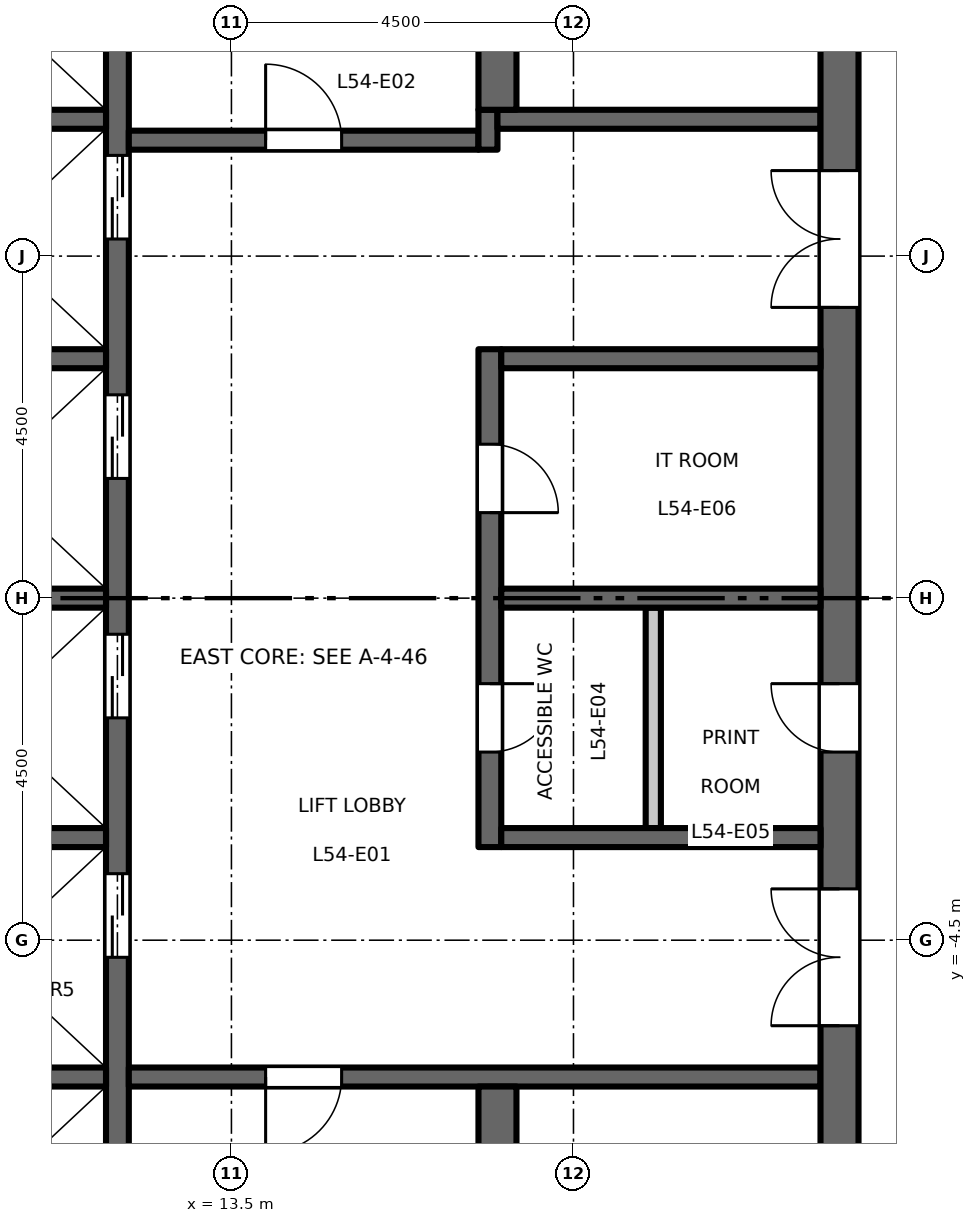
"""IFC4 building model, lengths in metres.
Left out: names, types, materials, properties, quantities, classifications, styles, units other than length and angle.
Written with IfcOpenShell. Run it as: python <this file> out.ifc"""

import sys

from ifc_helpers import new_model, si_unit, direction, frame, frame_2d, origin, place, context, subcontext, project, spatial, rectangle, extrude, element, fill, save


model = new_model("IFC4")
c1 = context("Model", 3, precision=1e-05, world=origin(), true_north=direction((0.0, 1.0)))
c2 = subcontext(c1, "Body", "Model", "MODEL_VIEW")
j1 = project(units=[si_unit("LENGTHUNIT", "METRE"), si_unit("PLANEANGLEUNIT", "RADIAN")], contexts=[c1])
p1 = place(None, origin())
s1 = spatial("IfcSite", under=j1, at=p1, CompositionType="ELEMENT")
p2 = place(p1, origin())
s2 = spatial("IfcBuilding", under=s1, at=p2, CompositionType="ELEMENT")
p3 = place(p2, frame((0.0, 0.0, 251.2)))
s3 = spatial("IfcBuildingStorey", under=s2, at=p3, CompositionType="ELEMENT", Elevation=251.2)
p4 = place(p3, frame((12.0, -9.45, 0.0), z_axis=(0.0, 0.0, 1.0), x_axis=(0.0, 1.0, 0.0)))
e1 = element("IfcWall", 1, at=p4, inside=s3, PredefinedType="SHEAR", context=c2, shape_type="SweptSolid", body=[
    extrude(rectangle(XDim=18.9, YDim=0.3, at=frame_2d((9.45, 0.0))), origin(), (0.0, 0.0, 1.0), 4.35),
])
p5 = place(p4, frame((4.725, 0.0, 0.0)))
e2 = element("IfcOpeningElement", 2, at=p5, cuts=e1, PredefinedType="OPENING", context=c2, shape_type="SweptSolid", body=[
    extrude(rectangle(XDim=1.1, YDim=2.1, at=frame_2d((0.55, 1.05))), frame((0.0, 0.16, 0.0), z_axis=(0.0, -1.0, 0.0), x_axis=(1.0, 0.0, 0.0)), (0.0, 0.0, 1.0), 0.32),
])
p6 = place(p4, frame((7.875, 0.0, 0.0)))
e3 = element("IfcOpeningElement", 3, at=p6, cuts=e1, PredefinedType="OPENING", context=c2, shape_type="SweptSolid", body=[
    extrude(rectangle(XDim=1.1, YDim=2.1, at=frame_2d((0.55, 1.05))), frame((0.0, 0.16, 0.0), z_axis=(0.0, -1.0, 0.0), x_axis=(1.0, 0.0, 0.0)), (0.0, 0.0, 1.0), 0.32),
])
p7 = place(p4, frame((11.025, 0.0, 0.0)))
e4 = element("IfcOpeningElement", 4, at=p7, cuts=e1, PredefinedType="OPENING", context=c2, shape_type="SweptSolid", body=[
    extrude(rectangle(XDim=1.1, YDim=2.1, at=frame_2d((0.55, 1.05))), frame((0.0, 0.16, 0.0), z_axis=(0.0, -1.0, 0.0), x_axis=(1.0, 0.0, 0.0)), (0.0, 0.0, 1.0), 0.32),
])
p8 = place(p4, frame((14.175, 0.0, 0.0)))
e5 = element("IfcOpeningElement", 5, at=p8, cuts=e1, PredefinedType="OPENING", context=c2, shape_type="SweptSolid", body=[
    extrude(rectangle(XDim=1.1, YDim=2.1, at=frame_2d((0.55, 1.05))), frame((0.0, 0.16, 0.0), z_axis=(0.0, -1.0, 0.0), x_axis=(1.0, 0.0, 0.0)), (0.0, 0.0, 1.0), 0.32),
])
p9 = place(p4, frame((16.725, 0.0, 0.0)))
e6 = element("IfcOpeningElement", 6, at=p9, cuts=e1, PredefinedType="OPENING", context=c2, shape_type="SweptSolid", body=[
    extrude(rectangle(XDim=1.2, YDim=2.1, at=frame_2d((0.6, 1.05))), frame((0.0, 0.16, 0.0), z_axis=(0.0, -1.0, 0.0), x_axis=(1.0, 0.0, 0.0)), (0.0, 0.0, 1.0), 0.32),
])
p10 = place(p4, frame((0.975, 0.0, 0.0)))
e7 = element("IfcOpeningElement", 7, at=p10, cuts=e1, PredefinedType="OPENING", context=c2, shape_type="SweptSolid", body=[
    extrude(rectangle(XDim=1.2, YDim=2.1, at=frame_2d((0.6, 1.05))), frame((0.0, 0.16, 0.0), z_axis=(0.0, -1.0, 0.0), x_axis=(1.0, 0.0, 0.0)), (0.0, 0.0, 1.0), 0.32),
])
p11 = place(p3, frame((12.15, 6.025, 0.0), z_axis=(0.0, 0.0, 1.0), x_axis=(1.0, 0.0, 0.0)))
e8 = element("IfcWall", 8, at=p11, inside=s3, PredefinedType="SHEAR", context=c2, shape_type="SweptSolid", body=[
    extrude(rectangle(XDim=4.6, YDim=0.25, at=frame_2d((2.3, 0.0))), origin(), (0.0, 0.0, 1.0), 4.35),
])
p12 = place(p11, frame((1.8, 0.0, 0.0)))
e9 = element("IfcOpeningElement", 9, at=p12, cuts=e8, PredefinedType="OPENING", context=c2, shape_type="SweptSolid", body=[
    extrude(rectangle(XDim=1.0, YDim=2.1, at=frame_2d((0.5, 1.05))), frame((0.0, 0.135, 0.0), z_axis=(0.0, -1.0, 0.0), x_axis=(1.0, 0.0, 0.0)), (0.0, 0.0, 1.0), 0.27),
])
p13 = place(p3, frame((16.875, 5.9, 0.0), z_axis=(0.0, 0.0, 1.0), x_axis=(0.0, 1.0, 0.0)))
e10 = element("IfcWall", 10, at=p13, inside=s3, PredefinedType="SHEAR", context=c2, shape_type="SweptSolid", body=[
    extrude(rectangle(XDim=0.525, YDim=0.25, at=frame_2d((0.263, 0.0))), origin(), (0.0, 0.0, 1.0), 4.35),
])
p14 = place(p3, frame((17.0, 6.3, 0.0), z_axis=(0.0, 0.0, 1.0), x_axis=(1.0, 0.0, 0.0)))
e11 = element("IfcWall", 11, at=p14, inside=s3, PredefinedType="SHEAR", context=c2, shape_type="SweptSolid", body=[
    extrude(rectangle(XDim=4.25, YDim=0.25, at=frame_2d((2.125, 0.0))), origin(), (0.0, 0.0, 1.0), 4.35),
])
p15 = place(p3, frame((12.15, -6.3, 0.0), z_axis=(0.0, 0.0, 1.0), x_axis=(1.0, 0.0, 0.0)))
e12 = element("IfcWall", 12, at=p15, inside=s3, PredefinedType="SHEAR", context=c2, shape_type="SweptSolid", body=[
    extrude(rectangle(XDim=9.1, YDim=0.25, at=frame_2d((4.55, 0.0))), origin(), (0.0, 0.0, 1.0), 4.35),
])
p16 = place(p15, frame((1.8, 0.0, 0.0)))
e13 = element("IfcOpeningElement", 13, at=p16, cuts=e12, PredefinedType="OPENING", context=c2, shape_type="SweptSolid", body=[
    extrude(rectangle(XDim=1.0, YDim=2.1, at=frame_2d((0.5, 1.05))), frame((0.0, 0.135, 0.0), z_axis=(0.0, -1.0, 0.0), x_axis=(1.0, 0.0, 0.0)), (0.0, 0.0, 1.0), 0.27),
])
p17 = place(p3, frame((21.5, -13.0, 0.0), z_axis=(0.0, 0.0, 1.0), x_axis=(0.0, 1.0, 0.0)))
e14 = element("IfcWall", 14, at=p17, inside=s3, PredefinedType="SHEAR", context=c2, shape_type="SweptSolid", body=[
    extrude(rectangle(XDim=26.0, YDim=0.5, at=frame_2d((13.0, 0.0))), origin(), (0.0, 0.0, 1.0), 4.35),
])
p18 = place(p17, frame((16.825, 0.0, 0.0)))
e15 = element("IfcOpeningElement", 15, at=p18, cuts=e14, PredefinedType="OPENING", context=c2, shape_type="SweptSolid", body=[
    extrude(rectangle(XDim=1.8, YDim=2.1, at=frame_2d((0.9, 1.05))), frame((0.0, 0.26, 0.0), z_axis=(0.0, -1.0, 0.0), x_axis=(1.0, 0.0, 0.0)), (0.0, 0.0, 1.0), 0.52),
])
p19 = place(p17, frame((7.375, 0.0, 0.0)))
e16 = element("IfcOpeningElement", 16, at=p19, cuts=e14, PredefinedType="OPENING", context=c2, shape_type="SweptSolid", body=[
    extrude(rectangle(XDim=1.8, YDim=2.1, at=frame_2d((0.9, 1.05))), frame((0.0, 0.26, 0.0), z_axis=(0.0, -1.0, 0.0), x_axis=(1.0, 0.0, 0.0)), (0.0, 0.0, 1.0), 0.52),
])
p20 = place(p17, frame((10.975, 0.0, 0.0)))
e17 = element("IfcOpeningElement", 17, at=p20, cuts=e14, PredefinedType="OPENING", context=c2, shape_type="SweptSolid", body=[
    extrude(rectangle(XDim=0.9, YDim=2.1, at=frame_2d((0.45, 1.05))), frame((0.0, 0.26, 0.0), z_axis=(0.0, -1.0, 0.0), x_axis=(1.0, 0.0, 0.0)), (0.0, 0.0, 1.0), 0.52),
])
p21 = place(p3, frame((16.9, -3.275, 0.0), z_axis=(0.0, 0.0, 1.0), x_axis=(0.0, 1.0, 0.0)))
e18 = element("IfcWall", 18, at=p21, inside=s3, PredefinedType="SHEAR", context=c2, shape_type="SweptSolid", body=[
    extrude(rectangle(XDim=6.55, YDim=0.3, at=frame_2d((3.275, 0.0))), origin(), (0.0, 0.0, 1.0), 4.35),
])
p22 = place(p21, frame((1.25, 0.0, 0.0)))
e19 = element("IfcOpeningElement", 19, at=p22, cuts=e18, PredefinedType="OPENING", context=c2, shape_type="SweptSolid", body=[
    extrude(rectangle(XDim=0.9, YDim=2.1, at=frame_2d((0.45, 1.05))), frame((0.0, 0.16, 0.0), z_axis=(0.0, -1.0, 0.0), x_axis=(1.0, 0.0, 0.0)), (0.0, 0.0, 1.0), 0.32),
])
p23 = place(p21, frame((4.4, 0.0, 0.0)))
e20 = element("IfcOpeningElement", 20, at=p23, cuts=e18, PredefinedType="OPENING", context=c2, shape_type="SweptSolid", body=[
    extrude(rectangle(XDim=0.9, YDim=2.1, at=frame_2d((0.45, 1.05))), frame((0.0, 0.16, 0.0), z_axis=(0.0, -1.0, 0.0), x_axis=(1.0, 0.0, 0.0)), (0.0, 0.0, 1.0), 0.32),
])
for number, where, z_axis, x_axis in (
    (21, (17.05, 0.0, 0.0), (0.0, 0.0, 1.0), (1.0, 0.0, 0.0)),
    (22, (17.05, 3.15, 0.0), (0.0, 0.0, 1.0), (1.0, 0.0, 0.0)),
    (23, (17.05, -3.15, 0.0), (0.0, 0.0, 1.0), (1.0, 0.0, 0.0)),
):
    element("IfcWall", number, at=place(p3, frame(where, z_axis=z_axis, x_axis=x_axis)), inside=s3, PredefinedType="SHEAR", context=c2, shape_type="SweptSolid", body=[
        extrude(rectangle(XDim=4.2, YDim=0.25, at=frame_2d((2.1, 0.0))), origin(), (0.0, 0.0, 1.0), 4.35),
    ])
p24 = place(p3, frame((19.05, -3.025, 0.0), z_axis=(0.0, 0.0, 1.0), x_axis=(0.0, 1.0, 0.0)))
e24 = element("IfcWall", 24, at=p24, inside=s3, PredefinedType="PARTITIONING", context=c2, shape_type="SweptSolid", body=[
    extrude(rectangle(XDim=2.9, YDim=0.2, at=frame_2d((1.45, 0.0))), origin(), (0.0, 0.0, 1.0), 4.35),
])
for number, where, z_axis, x_axis in (
    (25, (17.0, 6.425, 0.0), (0.0, 0.0, 1.0), (0.0, 1.0, 0.0)),
    (26, (17.0, -13.0, 0.0), (0.0, 0.0, 1.0), (0.0, 1.0, 0.0)),
):
    element("IfcWall", number, at=place(p3, frame(where, z_axis=z_axis, x_axis=x_axis)), inside=s3, PredefinedType="SHEAR", context=c2, shape_type="SweptSolid", body=[
        extrude(rectangle(XDim=6.575, YDim=0.5, at=frame_2d((3.288, 0.0))), origin(), (0.0, 0.0, 1.0), 4.35),
    ])
for number, where, z_axis, x_axis in (
    (27, (8.75, 0.0, 0.0), (0.0, 0.0, 1.0), (1.0, 0.0, 0.0)),
    (28, (8.75, 3.15, 0.0), (0.0, 0.0, 1.0), (1.0, 0.0, 0.0)),
    (29, (8.75, 6.3, 0.0), (0.0, 0.0, 1.0), (1.0, 0.0, 0.0)),
    (30, (8.75, -3.15, 0.0), (0.0, 0.0, 1.0), (1.0, 0.0, 0.0)),
    (31, (8.75, -6.3, 0.0), (0.0, 0.0, 1.0), (1.0, 0.0, 0.0)),
):
    element("IfcWall", number, at=place(p3, frame(where, z_axis=z_axis, x_axis=x_axis)), inside=s3, PredefinedType="SHEAR", context=c2, shape_type="SweptSolid", body=[
        extrude(rectangle(XDim=3.1, YDim=0.25, at=frame_2d((1.55, 0.0))), origin(), (0.0, 0.0, 1.0), 4.35),
    ])
p25 = place(p12, origin())
e32 = element("IfcDoor", 32, at=p25, inside=s3, OperationType="SINGLE_SWING_RIGHT", PredefinedType="DOOR", context=c2, shape_type="SweptSolid", body=[
    extrude(rectangle(XDim=1.0, YDim=2.1, at=frame_2d((0.5, 1.05))), frame((0.0, 0.025, 0.0), z_axis=(0.0, -1.0, 0.0), x_axis=(1.0, 0.0, 0.0)), (0.0, 0.0, 1.0), 0.05),
])
fill(e9, e32)
p26 = place(p16, origin())
e33 = element("IfcDoor", 33, at=p26, inside=s3, OperationType="SINGLE_SWING_LEFT", PredefinedType="DOOR", context=c2, shape_type="SweptSolid", body=[
    extrude(rectangle(XDim=1.0, YDim=2.1, at=frame_2d((0.5, 1.05))), frame((0.0, 0.025, 0.0), z_axis=(0.0, -1.0, 0.0), x_axis=(1.0, 0.0, 0.0)), (0.0, 0.0, 1.0), 0.05),
])
fill(e13, e33)
p27 = place(p18, origin())
e34 = element("IfcDoor", 34, at=p27, inside=s3, OperationType="DOUBLE_DOOR_DOUBLE_SWING", PredefinedType="DOOR", context=c2, shape_type="SweptSolid", body=[
    extrude(rectangle(XDim=1.8, YDim=2.1, at=frame_2d((0.9, 1.05))), frame((0.0, 0.025, 0.0), z_axis=(0.0, -1.0, 0.0), x_axis=(1.0, 0.0, 0.0)), (0.0, 0.0, 1.0), 0.05),
])
fill(e15, e34)
p28 = place(p19, origin())
e35 = element("IfcDoor", 35, at=p28, inside=s3, OperationType="DOUBLE_DOOR_DOUBLE_SWING", PredefinedType="DOOR", context=c2, shape_type="SweptSolid", body=[
    extrude(rectangle(XDim=1.8, YDim=2.1, at=frame_2d((0.9, 1.05))), frame((0.0, 0.025, 0.0), z_axis=(0.0, -1.0, 0.0), x_axis=(1.0, 0.0, 0.0)), (0.0, 0.0, 1.0), 0.05),
])
fill(e16, e35)
p29 = place(p5, origin())
e36 = element("IfcDoor", 36, at=p29, inside=s3, OperationType="DOUBLE_DOOR_SLIDING", PredefinedType="DOOR", context=c2, shape_type="SweptSolid", body=[
    extrude(rectangle(XDim=1.1, YDim=2.1, at=frame_2d((0.55, 1.05))), frame((0.0, 0.025, 0.0), z_axis=(0.0, -1.0, 0.0), x_axis=(1.0, 0.0, 0.0)), (0.0, 0.0, 1.0), 0.05),
])
fill(e2, e36)
p30 = place(p6, origin())
e37 = element("IfcDoor", 37, at=p30, inside=s3, OperationType="DOUBLE_DOOR_SLIDING", PredefinedType="DOOR", context=c2, shape_type="SweptSolid", body=[
    extrude(rectangle(XDim=1.1, YDim=2.1, at=frame_2d((0.55, 1.05))), frame((0.0, 0.025, 0.0), z_axis=(0.0, -1.0, 0.0), x_axis=(1.0, 0.0, 0.0)), (0.0, 0.0, 1.0), 0.05),
])
fill(e3, e37)
p31 = place(p7, origin())
e38 = element("IfcDoor", 38, at=p31, inside=s3, OperationType="DOUBLE_DOOR_SLIDING", PredefinedType="DOOR", context=c2, shape_type="SweptSolid", body=[
    extrude(rectangle(XDim=1.1, YDim=2.1, at=frame_2d((0.55, 1.05))), frame((0.0, 0.025, 0.0), z_axis=(0.0, -1.0, 0.0), x_axis=(1.0, 0.0, 0.0)), (0.0, 0.0, 1.0), 0.05),
])
fill(e4, e38)
p32 = place(p8, origin())
e39 = element("IfcDoor", 39, at=p32, inside=s3, OperationType="DOUBLE_DOOR_SLIDING", PredefinedType="DOOR", context=c2, shape_type="SweptSolid", body=[
    extrude(rectangle(XDim=1.1, YDim=2.1, at=frame_2d((0.55, 1.05))), frame((0.0, 0.025, 0.0), z_axis=(0.0, -1.0, 0.0), x_axis=(1.0, 0.0, 0.0)), (0.0, 0.0, 1.0), 0.05),
])
fill(e5, e39)
p33 = place(p22, origin())
e40 = element("IfcDoor", 40, at=p33, inside=s3, OperationType="SINGLE_SWING_RIGHT", PredefinedType="DOOR", context=c2, shape_type="SweptSolid", body=[
    extrude(rectangle(XDim=0.9, YDim=2.1, at=frame_2d((0.45, 1.05))), frame((0.0, 0.025, 0.0), z_axis=(0.0, -1.0, 0.0), x_axis=(1.0, 0.0, 0.0)), (0.0, 0.0, 1.0), 0.05),
])
fill(e19, e40)
p34 = place(p20, origin())
e41 = element("IfcDoor", 41, at=p34, inside=s3, OperationType="SINGLE_SWING_LEFT", PredefinedType="DOOR", context=c2, shape_type="SweptSolid", body=[
    extrude(rectangle(XDim=0.9, YDim=2.1, at=frame_2d((0.45, 1.05))), frame((0.0, 0.025, 0.0), z_axis=(0.0, -1.0, 0.0), x_axis=(1.0, 0.0, 0.0)), (0.0, 0.0, 1.0), 0.05),
])
fill(e17, e41)
p35 = place(p23, origin())
e42 = element("IfcDoor", 42, at=p35, inside=s3, OperationType="SINGLE_SWING_LEFT", PredefinedType="DOOR", context=c2, shape_type="SweptSolid", body=[
    extrude(rectangle(XDim=0.9, YDim=2.1, at=frame_2d((0.45, 1.05))), frame((0.0, 0.025, 0.0), z_axis=(0.0, -1.0, 0.0), x_axis=(1.0, 0.0, 0.0)), (0.0, 0.0, 1.0), 0.05),
])
fill(e20, e42)
save(model, sys.argv[1])
